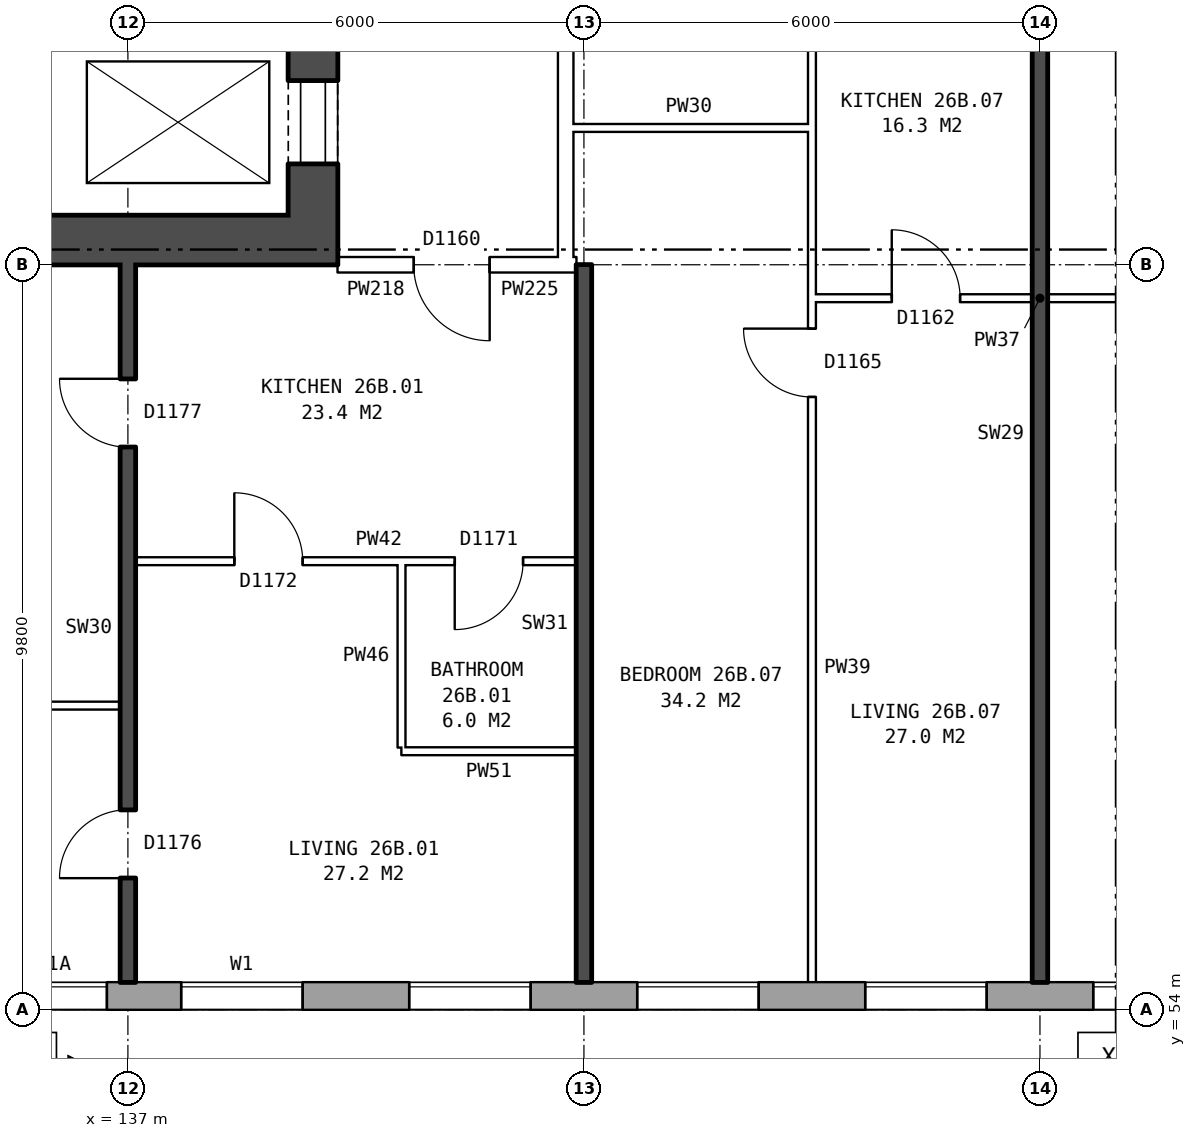
"""IFC4 building model, lengths in metres.
Left out: names, types, materials, properties, quantities, classifications, styles, units other than length and angle.
Written with IfcOpenShell. Run it as: python <this file> out.ifc"""

import sys

from ifc_helpers import new_model, si_unit, direction, frame, frame_2d, origin, place, context, subcontext, project, spatial, rectangle, extrude, element, fill, save


model = new_model("IFC4")
c1 = context("Model", 3, precision=1e-05, world=origin(), true_north=direction((0.0, 1.0)))
c2 = subcontext(c1, "Body", "Model", "MODEL_VIEW")
j1 = project(units=[si_unit("LENGTHUNIT", "METRE"), si_unit("PLANEANGLEUNIT", "RADIAN")], contexts=[c1])
p1 = place(None, origin())
s1 = spatial("IfcSite", under=j1, at=p1, CompositionType="ELEMENT")
p2 = place(p1, origin())
s2 = spatial("IfcBuilding", under=s1, at=p2, CompositionType="ELEMENT")
p3 = place(p2, frame((0.0, 0.0, 96.4)))
s3 = spatial("IfcBuildingStorey", under=s2, at=p3, CompositionType="ELEMENT", Elevation=96.4)
p4 = place(p3, frame((134.075, 54.18, 0.0), z_axis=(0.0, 0.0, 1.0), x_axis=(1.0, 0.0, 0.0)))
e1 = element("IfcWall", 1, at=p4, inside=s3, PredefinedType="STANDARD", context=c2, shape_type="SweptSolid", body=[
    extrude(rectangle(XDim=36.851, YDim=0.36, at=frame_2d((18.425, 0.0))), origin(), (0.0, 0.0, 1.0), 2.85),
])
p5 = place(p4, frame((0.35, 0.0, 0.8)))
e2 = element("IfcOpeningElement", 2, at=p5, cuts=e1, PredefinedType="OPENING", context=c2, shape_type="SweptSolid", body=[
    extrude(rectangle(XDim=0.6, YDim=1.2, at=frame_2d((0.3, 0.6))), frame((0.0, 0.19, 0.0), z_axis=(0.0, -1.0, 0.0), x_axis=(1.0, 0.0, 0.0)), (0.0, 0.0, 1.0), 0.38),
])
p6 = place(p4, frame((3.625, 0.0, 0.8)))
e3 = element("IfcOpeningElement", 3, at=p6, cuts=e1, PredefinedType="OPENING", context=c2, shape_type="SweptSolid", body=[
    extrude(rectangle(XDim=1.6, YDim=1.8, at=frame_2d((0.8, 0.9))), frame((0.0, 0.19, 0.0), z_axis=(0.0, -1.0, 0.0), x_axis=(1.0, 0.0, 0.0)), (0.0, 0.0, 1.0), 0.38),
])
p7 = place(p4, frame((6.625, 0.0, 0.8)))
e4 = element("IfcOpeningElement", 4, at=p7, cuts=e1, PredefinedType="OPENING", context=c2, shape_type="SweptSolid", body=[
    extrude(rectangle(XDim=1.6, YDim=1.8, at=frame_2d((0.8, 0.9))), frame((0.0, 0.19, 0.0), z_axis=(0.0, -1.0, 0.0), x_axis=(1.0, 0.0, 0.0)), (0.0, 0.0, 1.0), 0.38),
])
p8 = place(p4, frame((9.625, 0.0, 0.8)))
e5 = element("IfcOpeningElement", 5, at=p8, cuts=e1, PredefinedType="OPENING", context=c2, shape_type="SweptSolid", body=[
    extrude(rectangle(XDim=1.6, YDim=1.8, at=frame_2d((0.8, 0.9))), frame((0.0, 0.19, 0.0), z_axis=(0.0, -1.0, 0.0), x_axis=(1.0, 0.0, 0.0)), (0.0, 0.0, 1.0), 0.38),
])
p9 = place(p4, frame((12.625, 0.0, 0.8)))
e6 = element("IfcOpeningElement", 6, at=p9, cuts=e1, PredefinedType="OPENING", context=c2, shape_type="SweptSolid", body=[
    extrude(rectangle(XDim=1.6, YDim=1.8, at=frame_2d((0.8, 0.9))), frame((0.0, 0.19, 0.0), z_axis=(0.0, -1.0, 0.0), x_axis=(1.0, 0.0, 0.0)), (0.0, 0.0, 1.0), 0.38),
])
p10 = place(p4, frame((15.625, 0.0, 0.8)))
e7 = element("IfcOpeningElement", 7, at=p10, cuts=e1, PredefinedType="OPENING", context=c2, shape_type="SweptSolid", body=[
    extrude(rectangle(XDim=1.6, YDim=1.8, at=frame_2d((0.8, 0.9))), frame((0.0, 0.19, 0.0), z_axis=(0.0, -1.0, 0.0), x_axis=(1.0, 0.0, 0.0)), (0.0, 0.0, 1.0), 0.38),
])
p11 = place(p4, frame((18.625, 0.0, 0.8)))
e8 = element("IfcOpeningElement", 8, at=p11, cuts=e1, PredefinedType="OPENING", context=c2, shape_type="SweptSolid", body=[
    extrude(rectangle(XDim=1.6, YDim=1.8, at=frame_2d((0.8, 0.9))), frame((0.0, 0.19, 0.0), z_axis=(0.0, -1.0, 0.0), x_axis=(1.0, 0.0, 0.0)), (0.0, 0.0, 1.0), 0.38),
])
p12 = place(p4, frame((21.625, 0.0, 0.8)))
e9 = element("IfcOpeningElement", 9, at=p12, cuts=e1, PredefinedType="OPENING", context=c2, shape_type="SweptSolid", body=[
    extrude(rectangle(XDim=1.6, YDim=1.8, at=frame_2d((0.8, 0.9))), frame((0.0, 0.19, 0.0), z_axis=(0.0, -1.0, 0.0), x_axis=(1.0, 0.0, 0.0)), (0.0, 0.0, 1.0), 0.38),
])
p13 = place(p4, frame((24.625, 0.0, 0.8)))
e10 = element("IfcOpeningElement", 10, at=p13, cuts=e1, PredefinedType="OPENING", context=c2, shape_type="SweptSolid", body=[
    extrude(rectangle(XDim=1.6, YDim=1.8, at=frame_2d((0.8, 0.9))), frame((0.0, 0.19, 0.0), z_axis=(0.0, -1.0, 0.0), x_axis=(1.0, 0.0, 0.0)), (0.0, 0.0, 1.0), 0.38),
])
p14 = place(p4, frame((27.625, 0.0, 0.8)))
e11 = element("IfcOpeningElement", 11, at=p14, cuts=e1, PredefinedType="OPENING", context=c2, shape_type="SweptSolid", body=[
    extrude(rectangle(XDim=1.6, YDim=1.8, at=frame_2d((0.8, 0.9))), frame((0.0, 0.19, 0.0), z_axis=(0.0, -1.0, 0.0), x_axis=(1.0, 0.0, 0.0)), (0.0, 0.0, 1.0), 0.38),
])
p15 = place(p4, frame((30.625, 0.0, 0.8)))
e12 = element("IfcOpeningElement", 12, at=p15, cuts=e1, PredefinedType="OPENING", context=c2, shape_type="SweptSolid", body=[
    extrude(rectangle(XDim=1.6, YDim=1.8, at=frame_2d((0.8, 0.9))), frame((0.0, 0.19, 0.0), z_axis=(0.0, -1.0, 0.0), x_axis=(1.0, 0.0, 0.0)), (0.0, 0.0, 1.0), 0.38),
])
p16 = place(p4, frame((33.625, 0.0, 0.8)))
e13 = element("IfcOpeningElement", 13, at=p16, cuts=e1, PredefinedType="OPENING", context=c2, shape_type="SweptSolid", body=[
    extrude(rectangle(XDim=1.6, YDim=1.8, at=frame_2d((0.8, 0.9))), frame((0.0, 0.19, 0.0), z_axis=(0.0, -1.0, 0.0), x_axis=(1.0, 0.0, 0.0)), (0.0, 0.0, 1.0), 0.38),
])
p17 = place(p4, frame((1.25, 0.0, 0.8)))
e14 = element("IfcOpeningElement", 14, at=p17, cuts=e1, PredefinedType="OPENING", context=c2, shape_type="SweptSolid", body=[
    extrude(rectangle(XDim=1.4, YDim=1.8, at=frame_2d((0.7, 0.9))), frame((0.0, 0.19, 0.0), z_axis=(0.0, -1.0, 0.0), x_axis=(1.0, 0.0, 0.0)), (0.0, 0.0, 1.0), 0.38),
])
p18 = place(p3, frame((139.435, 64.45, 0.0), z_axis=(0.0, 0.0, 1.0), x_axis=(0.0, 1.0, 0.0)))
e15 = element("IfcWall", 15, at=p18, inside=s3, PredefinedType="SHEAR", context=c2, shape_type="SweptSolid", body=[
    extrude(rectangle(XDim=11.1, YDim=0.65, at=frame_2d((5.55, 0.0))), origin(), (0.0, 0.0, 1.0), 2.85),
])
p19 = place(p18, frame((0.675, 0.0, 0.0)))
e16 = element("IfcOpeningElement", 16, at=p19, cuts=e15, PredefinedType="OPENING", context=c2, shape_type="SweptSolid", body=[
    extrude(rectangle(XDim=1.1, YDim=2.1, at=frame_2d((0.55, 1.05))), frame((0.0, 0.335, 0.0), z_axis=(0.0, -1.0, 0.0), x_axis=(1.0, 0.0, 0.0)), (0.0, 0.0, 1.0), 0.67),
])
p20 = place(p18, frame((9.25, 0.0, 0.0)))
e17 = element("IfcOpeningElement", 17, at=p20, cuts=e15, PredefinedType="OPENING", context=c2, shape_type="SweptSolid", body=[
    extrude(rectangle(XDim=1.1, YDim=2.1, at=frame_2d((0.55, 1.05))), frame((0.0, 0.335, 0.0), z_axis=(0.0, -1.0, 0.0), x_axis=(1.0, 0.0, 0.0)), (0.0, 0.0, 1.0), 0.67),
])
p21 = place(p18, frame((7.475, 0.0, 0.0)))
e18 = element("IfcOpeningElement", 18, at=p21, cuts=e15, PredefinedType="OPENING", context=c2, shape_type="SweptSolid", body=[
    extrude(rectangle(XDim=0.85, YDim=2.1, at=frame_2d((0.425, 1.05))), frame((0.0, 0.335, 0.0), z_axis=(0.0, -1.0, 0.0), x_axis=(1.0, 0.0, 0.0)), (0.0, 0.0, 1.0), 0.67),
])
p22 = place(p3, frame((139.76, 64.125, 0.0), z_axis=(0.0, 0.0, 1.0), x_axis=(-1.0, 0.0, 0.0)))
e19 = element("IfcWall", 19, at=p22, inside=s3, PredefinedType="SHEAR", context=c2, shape_type="SweptSolid", body=[
    extrude(rectangle(XDim=8.4, YDim=0.65, at=frame_2d((4.2, 0.0))), origin(), (0.0, 0.0, 1.0), 2.85),
])
p23 = place(p3, frame((142.76, 63.9, 0.0), z_axis=(0.0, 0.0, 1.0), x_axis=(0.0, 1.0, 0.0)))
e20 = element("IfcWall", 20, at=p23, inside=s3, PredefinedType="PARTITIONING", context=c2, shape_type="SweptSolid", body=[
    extrude(rectangle(XDim=12.2, YDim=0.2, at=frame_2d((6.1, 0.0))), origin(), (0.0, 0.0, 1.0), 2.85),
])
p24 = place(p23, frame((5.1, 0.0, 0.0)))
e21 = element("IfcOpeningElement", 21, at=p24, cuts=e20, PredefinedType="OPENING", context=c2, shape_type="SweptSolid", body=[
    extrude(rectangle(XDim=2.0, YDim=2.1, at=frame_2d((1.0, 1.05))), frame((0.0, 0.11, 0.0), z_axis=(0.0, -1.0, 0.0), x_axis=(1.0, 0.0, 0.0)), (0.0, 0.0, 1.0), 0.22),
])
p25 = place(p3, frame((140.6, 57.4, 0.0), z_axis=(0.0, 0.0, 1.0), x_axis=(1.0, 0.0, 0.0)))
e22 = element("IfcWall", 22, at=p25, inside=s3, PredefinedType="PARTITIONING", context=c2, shape_type="SweptSolid", body=[
    extrude(rectangle(XDim=2.3, YDim=0.1, at=frame_2d((1.15, 0.0))), origin(), (0.0, 0.0, 1.0), 2.85),
])
p26 = place(p3, frame((131.36, 58.0, 0.0), z_axis=(0.0, 0.0, 1.0), x_axis=(1.0, 0.0, 0.0)))
e23 = element("IfcWall", 23, at=p26, inside=s3, PredefinedType="PARTITIONING", context=c2, shape_type="SweptSolid", body=[
    extrude(rectangle(XDim=5.54, YDim=0.1, at=frame_2d((2.77, 0.0))), origin(), (0.0, 0.0, 1.0), 2.85),
])
p27 = place(p3, frame((137.1, 59.9, 0.0), z_axis=(0.0, 0.0, 1.0), x_axis=(1.0, 0.0, 0.0)))
e24 = element("IfcWall", 24, at=p27, inside=s3, PredefinedType="PARTITIONING", context=c2, shape_type="SweptSolid", body=[
    extrude(rectangle(XDim=5.8, YDim=0.1, at=frame_2d((2.9, 0.0))), origin(), (0.0, 0.0, 1.0), 2.85),
])
p28 = place(p27, frame((1.3, 0.0, 0.0)))
e25 = element("IfcOpeningElement", 25, at=p28, cuts=e24, PredefinedType="OPENING", context=c2, shape_type="SweptSolid", body=[
    extrude(rectangle(XDim=0.9, YDim=2.1, at=frame_2d((0.45, 1.05))), frame((0.0, 0.06, 0.0), z_axis=(0.0, -1.0, 0.0), x_axis=(1.0, 0.0, 0.0)), (0.0, 0.0, 1.0), 0.12),
])
p29 = place(p27, frame((4.2, 0.0, 0.0)))
e26 = element("IfcOpeningElement", 26, at=p29, cuts=e24, PredefinedType="OPENING", context=c2, shape_type="SweptSolid", body=[
    extrude(rectangle(XDim=0.9, YDim=2.1, at=frame_2d((0.45, 1.05))), frame((0.0, 0.06, 0.0), z_axis=(0.0, -1.0, 0.0), x_axis=(1.0, 0.0, 0.0)), (0.0, 0.0, 1.0), 0.12),
])
p30 = place(p3, frame((146.0, 63.36, 0.0), z_axis=(0.0, 0.0, 1.0), x_axis=(1.0, 0.0, 0.0)))
e27 = element("IfcWall", 27, at=p30, inside=s3, PredefinedType="PARTITIONING", context=c2, shape_type="SweptSolid", body=[
    extrude(rectangle(XDim=6.0, YDim=0.1, at=frame_2d((3.0, 0.0))), origin(), (0.0, 0.0, 1.0), 2.85),
])
p31 = place(p30, frame((1.05, 0.0, 0.0)))
e28 = element("IfcOpeningElement", 28, at=p31, cuts=e27, PredefinedType="OPENING", context=c2, shape_type="SweptSolid", body=[
    extrude(rectangle(XDim=0.9, YDim=2.1, at=frame_2d((0.45, 1.05))), frame((0.0, 0.06, 0.0), z_axis=(0.0, -1.0, 0.0), x_axis=(1.0, 0.0, 0.0)), (0.0, 0.0, 1.0), 0.12),
])
p32 = place(p30, frame((4.05, 0.0, 0.0)))
e29 = element("IfcOpeningElement", 29, at=p32, cuts=e27, PredefinedType="OPENING", context=c2, shape_type="SweptSolid", body=[
    extrude(rectangle(XDim=0.9, YDim=2.1, at=frame_2d((0.45, 1.05))), frame((0.0, 0.06, 0.0), z_axis=(0.0, -1.0, 0.0), x_axis=(1.0, 0.0, 0.0)), (0.0, 0.0, 1.0), 0.12),
])
p33 = place(p3, frame((139.76, 63.8, 0.0), z_axis=(0.0, 0.0, 1.0), x_axis=(1.0, 0.0, 0.0)))
e30 = element("IfcWall", 30, at=p33, inside=s3, PredefinedType="PARTITIONING", context=c2, shape_type="SweptSolid", body=[
    extrude(rectangle(XDim=3.0, YDim=0.2, at=frame_2d((1.5, 0.0))), origin(), (0.0, 0.0, 1.0), 2.85),
])
p34 = place(p33, frame((1.0, 0.0, 0.0)))
e31 = element("IfcOpeningElement", 31, at=p34, cuts=e30, PredefinedType="OPENING", context=c2, shape_type="SweptSolid", body=[
    extrude(rectangle(XDim=1.0, YDim=2.1, at=frame_2d((0.5, 1.05))), frame((0.0, 0.11, 0.0), z_axis=(0.0, -1.0, 0.0), x_axis=(1.0, 0.0, 0.0)), (0.0, 0.0, 1.0), 0.22),
])
p35 = place(p3, frame((142.76, 63.8, 0.0), z_axis=(0.0, 0.0, 1.0), x_axis=(1.0, 0.0, 0.0)))
e32 = element("IfcWall", 32, at=p35, inside=s3, PredefinedType="PARTITIONING", context=c2, shape_type="SweptSolid", body=[
    extrude(rectangle(XDim=0.14, YDim=0.2, at=frame_2d((0.07, 0.0))), origin(), (0.0, 0.0, 1.0), 2.85),
])
p36 = place(p3, frame((142.76, 65.6, 0.0), z_axis=(0.0, 0.0, 1.0), x_axis=(1.0, 0.0, 0.0)))
e33 = element("IfcWall", 33, at=p36, inside=s3, PredefinedType="PARTITIONING", context=c2, shape_type="SweptSolid", body=[
    extrude(rectangle(XDim=3.24, YDim=0.1, at=frame_2d((1.62, 0.0))), origin(), (0.0, 0.0, 1.0), 2.85),
])
p37 = place(p3, frame((137.0, 54.36, 0.0), z_axis=(0.0, 0.0, 1.0), x_axis=(0.0, 1.0, 0.0)))
e34 = element("IfcWall", 34, at=p37, inside=s3, PredefinedType="SOLIDWALL", context=c2, shape_type="SweptSolid", body=[
    extrude(rectangle(XDim=9.44, YDim=0.2, at=frame_2d((4.72, 0.0))), origin(), (0.0, 0.0, 1.0), 2.85),
])
p38 = place(p37, frame((1.37, 0.0, 0.0)))
e35 = element("IfcOpeningElement", 35, at=p38, cuts=e34, PredefinedType="OPENING", context=c2, shape_type="SweptSolid", body=[
    extrude(rectangle(XDim=0.9, YDim=2.1, at=frame_2d((0.45, 1.05))), frame((0.0, 0.11, 0.0), z_axis=(0.0, -1.0, 0.0), x_axis=(1.0, 0.0, 0.0)), (0.0, 0.0, 1.0), 0.22),
])
p39 = place(p37, frame((7.04, 0.0, 0.0)))
e36 = element("IfcOpeningElement", 36, at=p39, cuts=e34, PredefinedType="OPENING", context=c2, shape_type="SweptSolid", body=[
    extrude(rectangle(XDim=0.9, YDim=2.1, at=frame_2d((0.45, 1.05))), frame((0.0, 0.11, 0.0), z_axis=(0.0, -1.0, 0.0), x_axis=(1.0, 0.0, 0.0)), (0.0, 0.0, 1.0), 0.22),
])
p40 = place(p3, frame((140.6, 57.45, 0.0), z_axis=(0.0, 0.0, 1.0), x_axis=(0.0, 1.0, 0.0)))
e37 = element("IfcWall", 37, at=p40, inside=s3, PredefinedType="PARTITIONING", context=c2, shape_type="SweptSolid", body=[
    extrude(rectangle(XDim=2.4, YDim=0.1, at=frame_2d((1.2, 0.0))), origin(), (0.0, 0.0, 1.0), 2.85),
])
p41 = place(p3, frame((143.0, 54.36, 0.0), z_axis=(0.0, 0.0, 1.0), x_axis=(0.0, 1.0, 0.0)))
e38 = element("IfcWall", 38, at=p41, inside=s3, PredefinedType="SOLIDWALL", context=c2, shape_type="SweptSolid", body=[
    extrude(rectangle(XDim=9.44, YDim=0.2, at=frame_2d((4.72, 0.0))), origin(), (0.0, 0.0, 1.0), 2.85),
])
p42 = place(p3, frame((146.0, 54.36, 0.0), z_axis=(0.0, 0.0, 1.0), x_axis=(0.0, 1.0, 0.0)))
e39 = element("IfcWall", 39, at=p42, inside=s3, PredefinedType="PARTITIONING", context=c2, shape_type="SweptSolid", body=[
    extrude(rectangle(XDim=14.34, YDim=0.1, at=frame_2d((7.17, 0.0))), origin(), (0.0, 0.0, 1.0), 2.85),
])
p43 = place(p42, frame((7.7, 0.0, 0.0)))
e40 = element("IfcOpeningElement", 40, at=p43, cuts=e39, PredefinedType="OPENING", context=c2, shape_type="SweptSolid", body=[
    extrude(rectangle(XDim=0.9, YDim=2.1, at=frame_2d((0.45, 1.05))), frame((0.0, 0.06, 0.0), z_axis=(0.0, -1.0, 0.0), x_axis=(1.0, 0.0, 0.0)), (0.0, 0.0, 1.0), 0.12),
])
p44 = place(p42, frame((13.04, 0.0, 0.0)))
e41 = element("IfcOpeningElement", 41, at=p44, cuts=e39, PredefinedType="OPENING", context=c2, shape_type="SweptSolid", body=[
    extrude(rectangle(XDim=0.9, YDim=2.1, at=frame_2d((0.45, 1.05))), frame((0.0, 0.06, 0.0), z_axis=(0.0, -1.0, 0.0), x_axis=(1.0, 0.0, 0.0)), (0.0, 0.0, 1.0), 0.12),
])
p45 = place(p3, frame((149.0, 54.36, 0.0), z_axis=(0.0, 0.0, 1.0), x_axis=(0.0, 1.0, 0.0)))
e42 = element("IfcWall", 42, at=p45, inside=s3, PredefinedType="SOLIDWALL", context=c2, shape_type="SweptSolid", body=[
    extrude(rectangle(XDim=14.44, YDim=0.2, at=frame_2d((7.22, 0.0))), origin(), (0.0, 0.0, 1.0), 2.85),
])
p46 = place(p6, origin())
e43 = element("IfcWindow", 43, at=p46, inside=s3, PartitioningType="SINGLE_PANEL", PredefinedType="WINDOW", context=c2, shape_type="SweptSolid", body=[
    extrude(rectangle(XDim=1.6, YDim=1.8, at=frame_2d((0.8, 0.9))), frame((0.0, 0.15, 0.0), z_axis=(0.0, -1.0, 0.0), x_axis=(1.0, 0.0, 0.0)), (0.0, 0.0, 1.0), 0.06),
])
fill(e3, e43)
p47 = place(p7, origin())
e44 = element("IfcWindow", 44, at=p47, inside=s3, PartitioningType="SINGLE_PANEL", PredefinedType="WINDOW", context=c2, shape_type="SweptSolid", body=[
    extrude(rectangle(XDim=1.6, YDim=1.8, at=frame_2d((0.8, 0.9))), frame((0.0, 0.15, 0.0), z_axis=(0.0, -1.0, 0.0), x_axis=(1.0, 0.0, 0.0)), (0.0, 0.0, 1.0), 0.06),
])
fill(e4, e44)
p48 = place(p8, origin())
e45 = element("IfcWindow", 45, at=p48, inside=s3, PartitioningType="SINGLE_PANEL", PredefinedType="WINDOW", context=c2, shape_type="SweptSolid", body=[
    extrude(rectangle(XDim=1.6, YDim=1.8, at=frame_2d((0.8, 0.9))), frame((0.0, 0.15, 0.0), z_axis=(0.0, -1.0, 0.0), x_axis=(1.0, 0.0, 0.0)), (0.0, 0.0, 1.0), 0.06),
])
fill(e5, e45)
p49 = place(p9, origin())
e46 = element("IfcWindow", 46, at=p49, inside=s3, PartitioningType="SINGLE_PANEL", PredefinedType="WINDOW", context=c2, shape_type="SweptSolid", body=[
    extrude(rectangle(XDim=1.6, YDim=1.8, at=frame_2d((0.8, 0.9))), frame((0.0, 0.15, 0.0), z_axis=(0.0, -1.0, 0.0), x_axis=(1.0, 0.0, 0.0)), (0.0, 0.0, 1.0), 0.06),
])
fill(e6, e46)
p50 = place(p10, origin())
e47 = element("IfcWindow", 47, at=p50, inside=s3, PartitioningType="SINGLE_PANEL", PredefinedType="WINDOW", context=c2, shape_type="SweptSolid", body=[
    extrude(rectangle(XDim=1.6, YDim=1.8, at=frame_2d((0.8, 0.9))), frame((0.0, 0.15, 0.0), z_axis=(0.0, -1.0, 0.0), x_axis=(1.0, 0.0, 0.0)), (0.0, 0.0, 1.0), 0.06),
])
fill(e7, e47)
p51 = place(p19, origin())
e48 = element("IfcDoor", 48, at=p51, inside=s3, OperationType="DOUBLE_DOOR_SLIDING", PredefinedType="DOOR", context=c2, shape_type="SweptSolid", body=[
    extrude(rectangle(XDim=1.1, YDim=2.1, at=frame_2d((0.55, 1.05))), frame((0.0, 0.31, 0.0), z_axis=(0.0, -1.0, 0.0), x_axis=(1.0, 0.0, 0.0)), (0.0, 0.0, 1.0), 0.05),
])
fill(e16, e48)
p52 = place(p38, origin())
e49 = element("IfcDoor", 49, at=p52, inside=s3, OperationType="SINGLE_SWING_LEFT", PredefinedType="DOOR", context=c2, shape_type="SweptSolid", body=[
    extrude(rectangle(XDim=0.9, YDim=2.1, at=frame_2d((0.45, 1.05))), frame((0.0, 0.025, 0.0), z_axis=(0.0, -1.0, 0.0), x_axis=(1.0, 0.0, 0.0)), (0.0, 0.0, 1.0), 0.05),
])
fill(e35, e49)
p53 = place(p39, origin())
e50 = element("IfcDoor", 50, at=p53, inside=s3, OperationType="SINGLE_SWING_RIGHT", PredefinedType="DOOR", context=c2, shape_type="SweptSolid", body=[
    extrude(rectangle(XDim=0.9, YDim=2.1, at=frame_2d((0.45, 1.05))), frame((0.0, 0.025, 0.0), z_axis=(0.0, -1.0, 0.0), x_axis=(1.0, 0.0, 0.0)), (0.0, 0.0, 1.0), 0.05),
])
fill(e36, e50)
p54 = place(p34, frame((1.0, 0.0, 0.0), z_axis=(0.0, 0.0, 1.0), x_axis=(-1.0, 0.0, 0.0)))
e51 = element("IfcDoor", 51, at=p54, inside=s3, OperationType="SINGLE_SWING_LEFT", PredefinedType="DOOR", context=c2, shape_type="SweptSolid", body=[
    extrude(rectangle(XDim=1.0, YDim=2.1, at=frame_2d((0.5, 1.05))), frame((0.0, 0.025, 0.0), z_axis=(0.0, -1.0, 0.0), x_axis=(1.0, 0.0, 0.0)), (0.0, 0.0, 1.0), 0.05),
])
fill(e31, e51)
p55 = place(p28, origin())
e52 = element("IfcDoor", 52, at=p55, inside=s3, OperationType="SINGLE_SWING_LEFT", PredefinedType="DOOR", context=c2, shape_type="SweptSolid", body=[
    extrude(rectangle(XDim=0.9, YDim=2.1, at=frame_2d((0.45, 1.05))), frame((0.0, 0.025, 0.0), z_axis=(0.0, -1.0, 0.0), x_axis=(1.0, 0.0, 0.0)), (0.0, 0.0, 1.0), 0.05),
])
fill(e25, e52)
p56 = place(p29, frame((0.9, 0.0, 0.0), z_axis=(0.0, 0.0, 1.0), x_axis=(-1.0, 0.0, 0.0)))
e53 = element("IfcDoor", 53, at=p56, inside=s3, OperationType="SINGLE_SWING_RIGHT", PredefinedType="DOOR", context=c2, shape_type="SweptSolid", body=[
    extrude(rectangle(XDim=0.9, YDim=2.1, at=frame_2d((0.45, 1.05))), frame((0.0, 0.025, 0.0), z_axis=(0.0, -1.0, 0.0), x_axis=(1.0, 0.0, 0.0)), (0.0, 0.0, 1.0), 0.05),
])
fill(e26, e53)
p57 = place(p43, origin())
e54 = element("IfcDoor", 54, at=p57, inside=s3, OperationType="SINGLE_SWING_RIGHT", PredefinedType="DOOR", context=c2, shape_type="SweptSolid", body=[
    extrude(rectangle(XDim=0.9, YDim=2.1, at=frame_2d((0.45, 1.05))), frame((0.0, 0.025, 0.0), z_axis=(0.0, -1.0, 0.0), x_axis=(1.0, 0.0, 0.0)), (0.0, 0.0, 1.0), 0.05),
])
fill(e40, e54)
p58 = place(p31, origin())
e55 = element("IfcDoor", 55, at=p58, inside=s3, OperationType="SINGLE_SWING_LEFT", PredefinedType="DOOR", context=c2, shape_type="SweptSolid", body=[
    extrude(rectangle(XDim=0.9, YDim=2.1, at=frame_2d((0.45, 1.05))), frame((0.0, 0.025, 0.0), z_axis=(0.0, -1.0, 0.0), x_axis=(1.0, 0.0, 0.0)), (0.0, 0.0, 1.0), 0.05),
])
fill(e28, e55)
p59 = place(p17, origin())
e56 = element("IfcWindow", 56, at=p59, inside=s3, PartitioningType="SINGLE_PANEL", PredefinedType="WINDOW", context=c2, shape_type="SweptSolid", body=[
    extrude(rectangle(XDim=1.4, YDim=1.8, at=frame_2d((0.7, 0.9))), frame((0.0, 0.15, 0.0), z_axis=(0.0, -1.0, 0.0), x_axis=(1.0, 0.0, 0.0)), (0.0, 0.0, 1.0), 0.06),
])
fill(e14, e56)
save(model, sys.argv[1])
